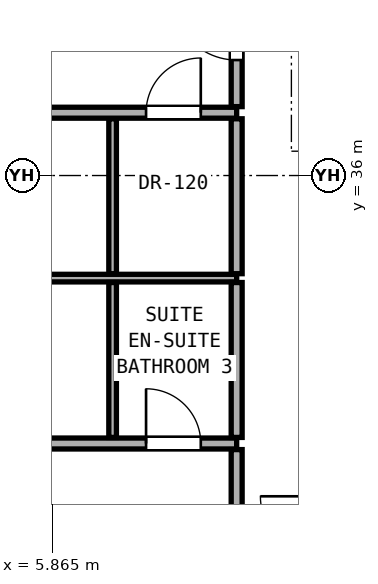
"""IFC4 building model, lengths in metres.
Left out: names, types, materials, properties, quantities, classifications, styles, units other than length and angle.
Written with IfcOpenShell. Run it as: python <this file> out.ifc"""

import sys

from ifc_helpers import new_model, si_unit, direction, frame, frame_2d, origin, place, context, subcontext, project, spatial, rectangle, extrude, element, fill, save


model = new_model("IFC4")
c1 = context("Model", 3, precision=1e-05, world=origin(), true_north=direction((0.0, 1.0)))
c2 = subcontext(c1, "Body", "Model", "MODEL_VIEW")
j1 = project(units=[si_unit("LENGTHUNIT", "METRE"), si_unit("PLANEANGLEUNIT", "RADIAN")], contexts=[c1])
p1 = place(None, origin())
s1 = spatial("IfcSite", under=j1, at=p1, CompositionType="ELEMENT")
p2 = place(p1, origin())
s2 = spatial("IfcBuilding", under=s1, at=p2, CompositionType="ELEMENT")
p3 = place(p2, frame((0.0, 0.0, 104.9)))
s3 = spatial("IfcBuildingStorey", under=s2, at=p3, CompositionType="ELEMENT", Elevation=104.9)
p4 = place(p3, frame((-1.13, 31.593, 0.0), z_axis=(0.0, 0.0, 1.0), x_axis=(1.0, 0.0, 0.0)))
e1 = element("IfcWall", 1, at=p4, inside=s3, PredefinedType="PARTITIONING", context=c2, shape_type="SweptSolid", body=[
    extrude(rectangle(XDim=10.03, YDim=0.18, at=frame_2d((5.015, 0.0))), origin(), (0.0, 0.0, 1.0), 2.145),
])
p5 = place(p4, frame((4.19, 0.0, 0.0)))
e2 = element("IfcOpeningElement", 2, at=p5, cuts=e1, PredefinedType="OPENING", context=c2, shape_type="SweptSolid", body=[
    extrude(rectangle(XDim=0.85, YDim=2.01, at=frame_2d((0.425, 1.005))), frame((0.0, 0.1, 0.0), z_axis=(0.0, -1.0, 0.0), x_axis=(1.0, 0.0, 0.0)), (0.0, 0.0, 1.0), 0.2),
])
p6 = place(p4, frame((8.54, 0.0, 0.0)))
e3 = element("IfcOpeningElement", 3, at=p6, cuts=e1, PredefinedType="OPENING", context=c2, shape_type="SweptSolid", body=[
    extrude(rectangle(XDim=0.9, YDim=2.1, at=frame_2d((0.45, 1.05))), frame((0.0, 0.1, 0.0), z_axis=(0.0, -1.0, 0.0), x_axis=(1.0, 0.0, 0.0)), (0.0, 0.0, 1.0), 0.2),
])
p7 = place(p3, frame((-1.13, 34.313, 0.0), z_axis=(0.0, 0.0, 1.0), x_axis=(1.0, 0.0, 0.0)))
e4 = element("IfcWall", 4, at=p7, inside=s3, PredefinedType="PARTITIONING", context=c2, shape_type="SweptSolid", body=[
    extrude(rectangle(XDim=10.03, YDim=0.125, at=frame_2d((5.015, 0.0))), origin(), (0.0, 0.0, 1.0), 2.145),
])
p8 = place(p3, frame((-1.13, 37.033, 0.0), z_axis=(0.0, 0.0, 1.0), x_axis=(1.0, 0.0, 0.0)))
e5 = element("IfcWall", 5, at=p8, inside=s3, PredefinedType="PARTITIONING", context=c2, shape_type="SweptSolid", body=[
    extrude(rectangle(XDim=10.03, YDim=0.18, at=frame_2d((5.015, 0.0))), origin(), (0.0, 0.0, 1.0), 2.145),
])
p9 = place(p8, frame((4.19, 0.0, 0.0)))
e6 = element("IfcOpeningElement", 6, at=p9, cuts=e5, PredefinedType="OPENING", context=c2, shape_type="SweptSolid", body=[
    extrude(rectangle(XDim=0.85, YDim=2.01, at=frame_2d((0.425, 1.005))), frame((0.0, 0.1, 0.0), z_axis=(0.0, -1.0, 0.0), x_axis=(1.0, 0.0, 0.0)), (0.0, 0.0, 1.0), 0.2),
])
p10 = place(p8, frame((8.54, 0.0, 0.0)))
e7 = element("IfcOpeningElement", 7, at=p10, cuts=e5, PredefinedType="OPENING", context=c2, shape_type="SweptSolid", body=[
    extrude(rectangle(XDim=0.9, YDim=2.1, at=frame_2d((0.45, 1.05))), frame((0.0, 0.1, 0.0), z_axis=(0.0, -1.0, 0.0), x_axis=(1.0, 0.0, 0.0)), (0.0, 0.0, 1.0), 0.2),
])
p11 = place(p3, frame((6.86, 31.693, 0.0), z_axis=(0.0, 0.0, 1.0), x_axis=(0.0, 1.0, 0.0)))
e8 = element("IfcWall", 8, at=p11, inside=s3, PredefinedType="PARTITIONING", context=c2, shape_type="SweptSolid", body=[
    extrude(rectangle(XDim=2.547, YDim=0.125, at=frame_2d((1.274, 0.0))), origin(), (0.0, 0.0, 1.0), 3.08),
])
p12 = place(p3, frame((6.86, 34.385, 0.0), z_axis=(0.0, 0.0, 1.0), x_axis=(0.0, 1.0, 0.0)))
e9 = element("IfcWall", 9, at=p12, inside=s3, PredefinedType="PARTITIONING", context=c2, shape_type="SweptSolid", body=[
    extrude(rectangle(XDim=2.548, YDim=0.125, at=frame_2d((1.274, 0.0))), origin(), (0.0, 0.0, 1.0), 3.08),
])
p13 = place(p3, frame((8.9, 27.909, 0.0), z_axis=(0.0, 0.0, 1.0), x_axis=(0.0, 1.0, 0.0)))
e10 = element("IfcWall", 10, at=p13, inside=s3, PredefinedType="PARTITIONING", context=c2, shape_type="SweptSolid", body=[
    extrude(rectangle(XDim=3.584, YDim=0.18, at=frame_2d((1.792, 0.0))), origin(), (0.0, 0.0, 1.0), 2.299),
])
p14 = place(p13, frame((1.267, 0.0, 0.0)))
e11 = element("IfcOpeningElement", 11, at=p14, cuts=e10, PredefinedType="OPENING", context=c2, shape_type="SweptSolid", body=[
    extrude(rectangle(XDim=1.05, YDim=2.2, at=frame_2d((0.525, 1.1))), frame((0.0, 0.1, 0.0), z_axis=(0.0, -1.0, 0.0), x_axis=(1.0, 0.0, 0.0)), (0.0, 0.0, 1.0), 0.2),
])
p15 = place(p3, frame((8.9, 31.693, 0.0), z_axis=(0.0, 0.0, 1.0), x_axis=(0.0, 1.0, 0.0)))
e12 = element("IfcWall", 12, at=p15, inside=s3, PredefinedType="PARTITIONING", context=c2, shape_type="SweptSolid", body=[
    extrude(rectangle(XDim=2.547, YDim=0.18, at=frame_2d((1.274, 0.0))), origin(), (0.0, 0.0, 1.0), 3.08),
])
p16 = place(p3, frame((8.9, 34.385, 0.0), z_axis=(0.0, 0.0, 1.0), x_axis=(0.0, 1.0, 0.0)))
e13 = element("IfcWall", 13, at=p16, inside=s3, PredefinedType="PARTITIONING", context=c2, shape_type="SweptSolid", body=[
    extrude(rectangle(XDim=2.548, YDim=0.18, at=frame_2d((1.274, 0.0))), origin(), (0.0, 0.0, 1.0), 3.08),
])
p17 = place(p3, frame((8.9, 37.133, 0.0), z_axis=(0.0, 0.0, 1.0), x_axis=(0.0, 1.0, 0.0)))
e14 = element("IfcWall", 14, at=p17, inside=s3, PredefinedType="PARTITIONING", context=c2, shape_type="SweptSolid", body=[
    extrude(rectangle(XDim=4.482, YDim=0.18, at=frame_2d((2.241, 0.0))), origin(), (0.0, 0.0, 1.0), 2.456),
])
p18 = place(p17, frame((0.766, 0.0, 0.0)))
e15 = element("IfcOpeningElement", 15, at=p18, cuts=e14, PredefinedType="OPENING", context=c2, shape_type="SweptSolid", body=[
    extrude(rectangle(XDim=1.05, YDim=2.2, at=frame_2d((0.525, 1.1))), frame((0.0, 0.1, 0.0), z_axis=(0.0, -1.0, 0.0), x_axis=(1.0, 0.0, 0.0)), (0.0, 0.0, 1.0), 0.2),
])
p19 = place(p6, origin())
e16 = element("IfcDoor", 16, at=p19, inside=s3, OperationType="SINGLE_SWING_LEFT", PredefinedType="DOOR", context=c2, shape_type="SweptSolid", body=[
    extrude(rectangle(XDim=0.9, YDim=2.1, at=frame_2d((0.45, 1.05))), frame((0.0, 0.025, 0.0), z_axis=(0.0, -1.0, 0.0), x_axis=(1.0, 0.0, 0.0)), (0.0, 0.0, 1.0), 0.05),
])
fill(e3, e16)
p20 = place(p18, origin())
e17 = element("IfcDoor", 17, at=p20, inside=s3, OperationType="SINGLE_SWING_RIGHT", PredefinedType="DOOR", context=c2, shape_type="SweptSolid", body=[
    extrude(rectangle(XDim=1.05, YDim=2.2, at=frame_2d((0.525, 1.1))), frame((0.0, 0.025, 0.0), z_axis=(0.0, -1.0, 0.0), x_axis=(1.0, 0.0, 0.0)), (0.0, 0.0, 1.0), 0.05),
])
fill(e15, e17)
p21 = place(p10, origin())
e18 = element("IfcDoor", 18, at=p21, inside=s3, OperationType="SINGLE_SWING_RIGHT", PredefinedType="DOOR", context=c2, shape_type="SweptSolid", body=[
    extrude(rectangle(XDim=0.9, YDim=2.1, at=frame_2d((0.45, 1.05))), frame((0.0, 0.025, 0.0), z_axis=(0.0, -1.0, 0.0), x_axis=(1.0, 0.0, 0.0)), (0.0, 0.0, 1.0), 0.05),
])
fill(e7, e18)
save(model, sys.argv[1])
